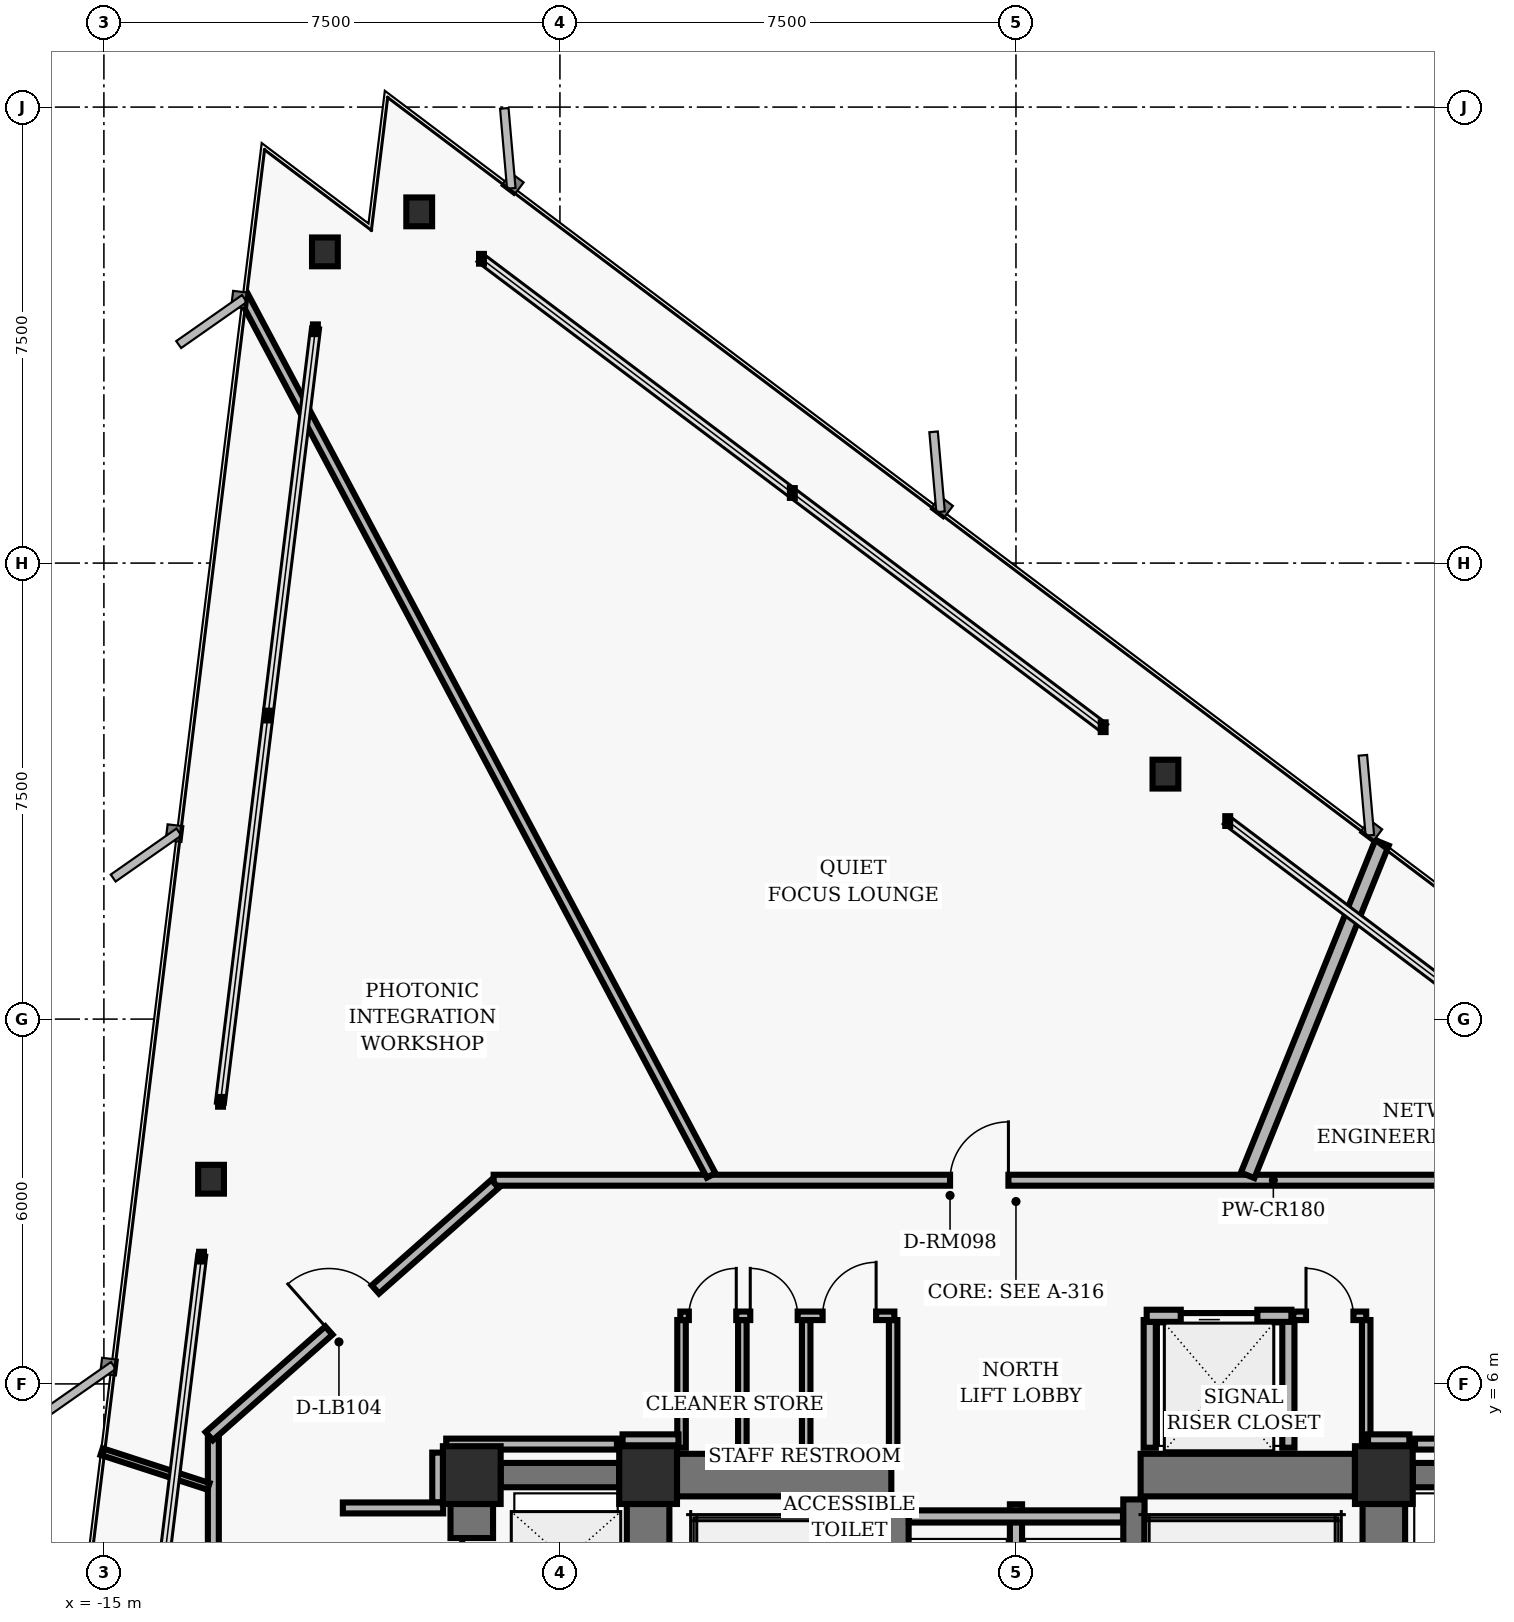
"""IFC4 building model, lengths in metres.
Left out: names, types, materials, properties, quantities, classifications, styles, units other than length and angle.
Written with IfcOpenShell. Run it as: python <this file> out.ifc"""

import sys

from ifc_helpers import new_model, si_unit, direction, frame, frame_2d, origin, origin_2d, place, context, subcontext, project, spatial, rectangle, hollow_rectangle, i_section, extrude, element, fill, save


model = new_model("IFC4")
c1 = context("Model", 3, precision=1e-05, world=origin(), true_north=direction((0.0, 1.0)))
c2 = subcontext(c1, "Body", "Model", "MODEL_VIEW")
j1 = project(units=[si_unit("LENGTHUNIT", "METRE"), si_unit("PLANEANGLEUNIT", "RADIAN")], contexts=[c1])
p1 = place(None, origin())
s1 = spatial("IfcSite", under=j1, at=p1, CompositionType="ELEMENT")
p2 = place(p1, origin())
s2 = spatial("IfcBuilding", under=s1, at=p2, CompositionType="ELEMENT")
p3 = place(p2, frame((0.0, 0.0, 49.6)))
s3 = spatial("IfcBuildingStorey", under=s2, at=p3, CompositionType="ELEMENT", Elevation=49.6)
for number, where, z_axis, x_axis in (
    (1, (-6.05, 4.5, 0.0), (0.0, 0.0, 1.0), (1.0, 0.0, 0.0)),
    (2, (6.05, 4.5, 0.0), (0.0, 0.0, 1.0), (1.0, 0.0, 0.0)),
    (3, (-8.95, 4.5, 0.0), (0.0, 0.0, 1.0), (1.0, 0.0, 0.0)),
):
    element("IfcColumn", number, at=place(p3, frame(where, z_axis=z_axis, x_axis=x_axis)), inside=s3, PredefinedType="COLUMN", context=c2, shape_type="SweptSolid", body=[
        extrude(hollow_rectangle(XDim=0.95, YDim=0.95, WallThickness=0.06, InnerFilletRadius=0.02, OuterFilletRadius=0.04, at=origin_2d()), origin(), (0.0, 0.0, 1.0), 3.36),
    ])
for number, where, z_axis, x_axis in (
    (4, (-6.05, 0.475, 0.0), (0.0, 0.0, 1.0), (0.0, 1.0, 0.0)),
    (5, (6.05, 0.475, 0.0), (0.0, 0.0, 1.0), (0.0, 1.0, 0.0)),
):
    element("IfcWall", number, at=place(p3, frame(where, z_axis=z_axis, x_axis=x_axis)), inside=s3, PredefinedType="SHEAR", context=c2, shape_type="SweptSolid", body=[
        extrude(rectangle(XDim=3.55, YDim=0.7, at=frame_2d((1.775, 0.0))), origin(), (0.0, 0.0, 1.0), 3.098),
    ])
for number, where, z_axis, x_axis in (
    (6, (-1.94, -4.1, 0.0), (0.0, 0.0, 1.0), (0.0, 1.0, 0.0)),
    (7, (1.94, -4.1, 0.0), (0.0, 0.0, 1.0), (0.0, 1.0, 0.0)),
):
    element("IfcWall", number, at=place(p3, frame(where, z_axis=z_axis, x_axis=x_axis)), inside=s3, PredefinedType="SHEAR", context=c2, shape_type="SweptSolid", body=[
        extrude(rectangle(XDim=8.2, YDim=0.35, at=frame_2d((4.1, 0.0))), origin(), (0.0, 0.0, 1.0), 3.098),
    ])
for number, where, z_axis, x_axis in (
    (8, (-5.575, 4.5, 0.0), (0.0, 0.0, 1.0), (1.0, 0.0, 0.0)),
    (9, (2.05, 4.5, 0.0), (0.0, 0.0, 1.0), (1.0, 0.0, 0.0)),
):
    element("IfcWall", number, at=place(p3, frame(where, z_axis=z_axis, x_axis=x_axis)), inside=s3, PredefinedType="SHEAR", context=c2, shape_type="SweptSolid", body=[
        extrude(rectangle(XDim=3.525, YDim=0.7, at=frame_2d((1.762, 0.0))), origin(), (0.0, 0.0, 1.0), 3.098),
    ])
p4 = place(p3, frame((-8.95, -3.825, 0.0), z_axis=(0.0, 0.0, 1.0), x_axis=(0.0, 1.0, 0.0)))
e10 = element("IfcWall", 10, at=p4, inside=s3, PredefinedType="SHEAR", context=c2, shape_type="SweptSolid", body=[
    extrude(rectangle(XDim=7.85, YDim=0.7, at=frame_2d((3.925, 0.0))), origin(), (0.0, 0.0, 1.0), 3.098),
])
p5 = place(p4, frame((0.55, 0.0, 0.0)))
e11 = element("IfcOpeningElement", 11, at=p5, cuts=e10, PredefinedType="OPENING", context=c2, shape_type="SweptSolid", body=[
    extrude(rectangle(XDim=1.06, YDim=2.04, at=frame_2d((0.53, 1.02))), frame((0.0, 0.36, 0.0), z_axis=(0.0, -1.0, 0.0), x_axis=(1.0, 0.0, 0.0)), (0.0, 0.0, 1.0), 0.72),
])
p6 = place(p4, frame((3.395, 0.0, 0.0)))
e12 = element("IfcOpeningElement", 12, at=p6, cuts=e10, PredefinedType="OPENING", context=c2, shape_type="SweptSolid", body=[
    extrude(rectangle(XDim=1.06, YDim=2.04, at=frame_2d((0.53, 1.02))), frame((0.0, 0.36, 0.0), z_axis=(0.0, -1.0, 0.0), x_axis=(1.0, 0.0, 0.0)), (0.0, 0.0, 1.0), 0.72),
])
p7 = place(p4, frame((6.23, 0.0, 0.0)))
e13 = element("IfcOpeningElement", 13, at=p7, cuts=e10, PredefinedType="OPENING", context=c2, shape_type="SweptSolid", body=[
    extrude(rectangle(XDim=1.06, YDim=2.04, at=frame_2d((0.53, 1.02))), frame((0.0, 0.36, 0.0), z_axis=(0.0, -1.0, 0.0), x_axis=(1.0, 0.0, 0.0)), (0.0, 0.0, 1.0), 0.72),
])
for number, where, z_axis, x_axis in (
    (14, (-8.475, 4.5, 0.0), (0.0, 0.0, 1.0), (1.0, 0.0, 0.0)),
    (15, (6.525, 4.5, 0.0), (0.0, 0.0, 1.0), (1.0, 0.0, 0.0)),
):
    element("IfcWall", number, at=place(p3, frame(where, z_axis=z_axis, x_axis=x_axis)), inside=s3, PredefinedType="SHEAR", context=c2, shape_type="SweptSolid", body=[
        extrude(rectangle(XDim=1.95, YDim=0.4, at=frame_2d((0.975, 0.0))), origin(), (0.0, 0.0, 1.0), 3.098),
    ])
for number, where, z_axis, x_axis in (
    (16, (2.458, 16.029, 0.0), (0.0, 0.0, 1.0), (1.0, 0.0, 0.0)),
    (17, (-9.814, 25.277, 0.0), (0.0, 0.0, 1.0), (1.0, 0.0, 0.0)),
    (18, (-11.365, 24.619, 0.0), (0.0, 0.0, 1.0), (1.0, 0.0, 0.0)),
    (19, (-13.238, 9.366, 0.0), (0.0, 0.0, 1.0), (1.0, 0.0, 0.0)),
):
    element("IfcColumn", number, at=place(p3, frame(where, z_axis=z_axis, x_axis=x_axis)), inside=s3, PredefinedType="COLUMN", context=c2, shape_type="SweptSolid", body=[
        extrude(i_section(OverallWidth=0.424, OverallDepth=0.474, WebThickness=0.048, FlangeThickness=0.077, FilletRadius=0.025, at=origin_2d()), origin(), (0.0, 0.0, 1.0), 3.36),
    ])
p8 = place(p3, frame((0.0, 1.25, 0.0), z_axis=(0.0, 0.0, 1.0), x_axis=(0.0, 1.0, 0.0)))
e20 = element("IfcWall", 20, at=p8, inside=s3, PredefinedType="PARTITIONING", context=c2, shape_type="SweptSolid", body=[
    extrude(rectangle(XDim=2.77, YDim=0.2, at=frame_2d((1.385, 0.0))), origin(), (0.0, 0.0, 1.0), 3.073),
])
p9 = place(p3, frame((-1.76, 3.82, 0.0), z_axis=(0.0, 0.0, 1.0), x_axis=(1.0, 0.0, 0.0)))
e21 = element("IfcWall", 21, at=p9, inside=s3, PredefinedType="PARTITIONING", context=c2, shape_type="SweptSolid", body=[
    extrude(rectangle(XDim=3.52, YDim=0.2, at=frame_2d((1.76, 0.0))), origin(), (0.0, 0.0, 1.0), 3.073),
])
for number, where, z_axis, x_axis in (
    (22, (2.2, 4.95, 0.0), (0.0, 0.0, 1.0), (0.0, 1.0, 0.0)),
    (23, (4.48, 4.95, 0.0), (0.0, 0.0, 1.0), (0.0, 1.0, 0.0)),
):
    element("IfcWall", number, at=place(p3, frame(where, z_axis=z_axis, x_axis=x_axis)), inside=s3, PredefinedType="PARTITIONING", context=c2, shape_type="SweptSolid", body=[
        extrude(rectangle(XDim=2.1, YDim=0.2, at=frame_2d((1.05, 0.0))), origin(), (0.0, 0.0, 1.0), 3.073),
    ])
p10 = place(p3, frame((2.15, 7.12, 0.0), z_axis=(0.0, 0.0, 1.0), x_axis=(1.0, 0.0, 0.0)))
e24 = element("IfcWall", 24, at=p10, inside=s3, PredefinedType="PARTITIONING", context=c2, shape_type="SweptSolid", body=[
    extrude(rectangle(XDim=2.38, YDim=0.2, at=frame_2d((1.19, 0.0))), origin(), (0.0, 0.0, 1.0), 2.587),
])
p11 = place(p10, frame((0.56, 0.0, 0.0)))
e25 = element("IfcOpeningElement", 25, at=p11, cuts=e24, PredefinedType="OPENING", context=c2, shape_type="SweptSolid", body=[
    extrude(rectangle(XDim=1.26, YDim=2.06, at=frame_2d((0.63, 1.03))), frame((0.0, 0.11, 0.0), z_axis=(0.0, -1.0, 0.0), x_axis=(1.0, 0.0, 0.0)), (0.0, 0.0, 1.0), 0.22),
])
for number, where, z_axis, x_axis in (
    (26, (-5.5, 4.95, 0.0), (0.0, 0.0, 1.0), (0.0, 1.0, 0.0)),
    (27, (-4.5, 4.95, 0.0), (0.0, 0.0, 1.0), (0.0, 1.0, 0.0)),
    (28, (-3.45, 4.95, 0.0), (0.0, 0.0, 1.0), (0.0, 1.0, 0.0)),
    (29, (-2.02, 4.95, 0.0), (0.0, 0.0, 1.0), (0.0, 1.0, 0.0)),
):
    element("IfcWall", number, at=place(p3, frame(where, z_axis=z_axis, x_axis=x_axis)), inside=s3, PredefinedType="PARTITIONING", context=c2, shape_type="SweptSolid", body=[
        extrude(rectangle(XDim=2.1, YDim=0.14, at=frame_2d((1.05, 0.0))), origin(), (0.0, 0.0, 1.0), 3.073),
    ])
p12 = place(p3, frame((-5.52, 7.12, 0.0), z_axis=(0.0, 0.0, 1.0), x_axis=(1.0, 0.0, 0.0)))
e30 = element("IfcWall", 30, at=p12, inside=s3, PredefinedType="PARTITIONING", context=c2, shape_type="SweptSolid", body=[
    extrude(rectangle(XDim=3.52, YDim=0.14, at=frame_2d((1.76, 0.0))), origin(), (0.0, 0.0, 1.0), 3.073),
])
p13 = place(p12, frame((0.14, 0.0, 0.0)))
e31 = element("IfcOpeningElement", 31, at=p13, cuts=e30, PredefinedType="OPENING", context=c2, shape_type="SweptSolid", body=[
    extrude(rectangle(XDim=0.78, YDim=2.01, at=frame_2d((0.39, 1.005))), frame((0.0, 0.08, 0.0), z_axis=(0.0, -1.0, 0.0), x_axis=(1.0, 0.0, 0.0)), (0.0, 0.0, 1.0), 0.16),
])
p14 = place(p12, frame((1.15, 0.0, 0.0)))
e32 = element("IfcOpeningElement", 32, at=p14, cuts=e30, PredefinedType="OPENING", context=c2, shape_type="SweptSolid", body=[
    extrude(rectangle(XDim=0.78, YDim=2.01, at=frame_2d((0.39, 1.005))), frame((0.0, 0.08, 0.0), z_axis=(0.0, -1.0, 0.0), x_axis=(1.0, 0.0, 0.0)), (0.0, 0.0, 1.0), 0.16),
])
p15 = place(p12, frame((2.34, 0.0, 0.0)))
e33 = element("IfcOpeningElement", 33, at=p15, cuts=e30, PredefinedType="OPENING", context=c2, shape_type="SweptSolid", body=[
    extrude(rectangle(XDim=0.88, YDim=2.02, at=frame_2d((0.44, 1.01))), frame((0.0, 0.08, 0.0), z_axis=(0.0, -1.0, 0.0), x_axis=(1.0, 0.0, 0.0)), (0.0, 0.0, 1.0), 0.16),
])
p16 = place(p3, frame((5.76, 4.95, 0.0), z_axis=(0.0, 0.0, 1.0), x_axis=(0.0, 1.0, 0.0)))
e34 = element("IfcWall", 34, at=p16, inside=s3, PredefinedType="PARTITIONING", context=c2, shape_type="SweptSolid", body=[
    extrude(rectangle(XDim=2.1, YDim=0.14, at=frame_2d((1.05, 0.0))), origin(), (0.0, 0.0, 1.0), 3.073),
])
p17 = place(p3, frame((4.56, 7.12, 0.0), z_axis=(0.0, 0.0, 1.0), x_axis=(1.0, 0.0, 0.0)))
e35 = element("IfcWall", 35, at=p17, inside=s3, PredefinedType="PARTITIONING", context=c2, shape_type="SweptSolid", body=[
    extrude(rectangle(XDim=1.2, YDim=0.14, at=frame_2d((0.6, 0.0))), origin(), (0.0, 0.0, 1.0), 2.587),
])
p18 = place(p17, frame((0.21, 0.0, 0.0)))
e36 = element("IfcOpeningElement", 36, at=p18, cuts=e35, PredefinedType="OPENING", context=c2, shape_type="SweptSolid", body=[
    extrude(rectangle(XDim=0.78, YDim=2.01, at=frame_2d((0.39, 1.005))), frame((0.0, 0.08, 0.0), z_axis=(0.0, -1.0, 0.0), x_axis=(1.0, 0.0, 0.0)), (0.0, 0.0, 1.0), 0.16),
])
p19 = place(p3, frame((-8.59, 9.35, 0.0), z_axis=(0.0, 0.0, 1.0), x_axis=(1.0, 0.0, 0.0)))
e37 = element("IfcWall", 37, at=p19, inside=s3, PredefinedType="PARTITIONING", context=c2, shape_type="SweptSolid", body=[
    extrude(rectangle(XDim=17.18, YDim=0.18, at=frame_2d((8.59, 0.0))), origin(), (0.0, 0.0, 1.0), 3.073),
])
p20 = place(p19, frame((7.506, 0.0, 0.0)))
e38 = element("IfcOpeningElement", 38, at=p20, cuts=e37, PredefinedType="OPENING", context=c2, shape_type="SweptSolid", body=[
    extrude(rectangle(XDim=0.96, YDim=2.02, at=frame_2d((0.48, 1.01))), frame((0.0, 0.1, 0.0), z_axis=(0.0, -1.0, 0.0), x_axis=(1.0, 0.0, 0.0)), (0.0, 0.0, 1.0), 0.2),
])
p21 = place(p3, frame((-13.2, -5.11, 0.0), z_axis=(0.0, 0.0, 1.0), x_axis=(0.0, 1.0, 0.0)))
e39 = element("IfcWall", 39, at=p21, inside=s3, PredefinedType="PARTITIONING", context=c2, shape_type="SweptSolid", body=[
    extrude(rectangle(XDim=10.22, YDim=0.18, at=frame_2d((5.11, 0.0))), origin(), (0.0, 0.0, 1.0), 2.587),
])
p22 = place(p21, frame((5.132, 0.0, 0.0)))
e40 = element("IfcOpeningElement", 40, at=p22, cuts=e39, PredefinedType="OPENING", context=c2, shape_type="SweptSolid", body=[
    extrude(rectangle(XDim=0.96, YDim=2.02, at=frame_2d((0.48, 1.01))), frame((0.0, 0.1, 0.0), z_axis=(0.0, -1.0, 0.0), x_axis=(1.0, 0.0, 0.0)), (0.0, 0.0, 1.0), 0.2),
])
p23 = place(p3, frame((-13.268, 5.14, 0.0), z_axis=(0.0, 0.0, 1.0), x_axis=(0.749626463267, 0.66186113768, 0.0)))
e41 = element("IfcWall", 41, at=p23, inside=s3, PredefinedType="PARTITIONING", context=c2, shape_type="SweptSolid", body=[
    extrude(rectangle(XDim=6.27, YDim=0.18, at=frame_2d((3.135, 0.0))), origin(), (0.0, 0.0, 1.0), 3.073),
])
p24 = place(p23, frame((2.625, 0.0, 0.0)))
e42 = element("IfcOpeningElement", 42, at=p24, cuts=e41, PredefinedType="OPENING", context=c2, shape_type="SweptSolid", body=[
    extrude(rectangle(XDim=1.02, YDim=2.02, at=frame_2d((0.51, 1.01))), frame((0.0, 0.1, 0.0), z_axis=(0.0, -1.0, 0.0), x_axis=(1.0, 0.0, 0.0)), (0.0, 0.0, 1.0), 0.2),
])
p25 = place(p3, frame((-9.51, 4.87, 0.0), z_axis=(0.0, 0.0, 1.0), x_axis=(0.0, -1.0, 0.0)))
e43 = element("IfcWall", 43, at=p25, inside=s3, PredefinedType="PARTITIONING", context=c2, shape_type="SweptSolid", body=[
    extrude(rectangle(XDim=0.82, YDim=0.18, at=frame_2d((0.41, 0.0))), origin(), (0.0, 0.0, 1.0), 3.073),
])
p26 = place(p3, frame((-9.42, 3.96, 0.0), z_axis=(0.0, 0.0, 1.0), x_axis=(-1.0, 0.0, 0.0)))
e44 = element("IfcWall", 44, at=p26, inside=s3, PredefinedType="PARTITIONING", context=c2, shape_type="SweptSolid", body=[
    extrude(rectangle(XDim=1.65, YDim=0.18, at=frame_2d((0.825, 0.0))), origin(), (0.0, 0.0, 1.0), 3.073),
])
p27 = place(p3, frame((9.37, 5.01, 0.0), z_axis=(0.0, 0.0, 1.0), x_axis=(-1.0, 0.0, 0.0)))
e45 = element("IfcWall", 45, at=p27, inside=s3, PredefinedType="PARTITIONING", context=c2, shape_type="SweptSolid", body=[
    extrude(rectangle(XDim=2.808, YDim=0.18, at=frame_2d((1.404, 0.0))), origin(), (0.0, 0.0, 1.0), 3.073),
])
p28 = place(p3, frame((6.47, 5.08, 0.0), z_axis=(0.0, 0.0, 1.0), x_axis=(-1.0, 0.0, 0.0)))
e46 = element("IfcWall", 46, at=p28, inside=s3, PredefinedType="PARTITIONING", context=c2, shape_type="SweptSolid", body=[
    extrude(rectangle(XDim=0.68, YDim=0.18, at=frame_2d((0.34, 0.0))), origin(), (0.0, 0.0, 1.0), 3.073),
])
p29 = place(p3, frame((-5.55, 5.08, 0.0), z_axis=(0.0, 0.0, 1.0), x_axis=(-1.0, 0.0, 0.0)))
e47 = element("IfcWall", 47, at=p29, inside=s3, PredefinedType="PARTITIONING", context=c2, shape_type="SweptSolid", body=[
    extrude(rectangle(XDim=0.92, YDim=0.18, at=frame_2d((0.46, 0.0))), origin(), (0.0, 0.0, 1.0), 3.073),
])
p30 = place(p3, frame((-6.562, 5.01, 0.0), z_axis=(0.0, 0.0, 1.0), x_axis=(-1.0, 0.0, 0.0)))
e48 = element("IfcWall", 48, at=p30, inside=s3, PredefinedType="PARTITIONING", context=c2, shape_type="SweptSolid", body=[
    extrude(rectangle(XDim=2.808, YDim=0.18, at=frame_2d((1.404, 0.0))), origin(), (0.0, 0.0, 1.0), 3.073),
])
p31 = place(p3, frame((3.81, 9.43, 0.0), z_axis=(0.0, 0.0, 1.0), x_axis=(0.374593091461, 0.927189309596, 0.0)))
e49 = element("IfcWall", 49, at=p31, inside=s3, PredefinedType="PARTITIONING", context=c2, shape_type="SweptSolid", body=[
    extrude(rectangle(XDim=5.898, YDim=0.24, at=frame_2d((2.949, 0.0))), origin(), (0.0, 0.0, 1.0), 3.073),
])
p32 = place(p3, frame((-5.014, 9.43, 0.0), z_axis=(0.0, 0.0, 1.0), x_axis=(-0.469473054772, 0.882946799554, 0.0)))
e50 = element("IfcWall", 50, at=p32, inside=s3, PredefinedType="PARTITIONING", context=c2, shape_type="SweptSolid", body=[
    extrude(rectangle(XDim=16.379, YDim=0.16, at=frame_2d((8.19, 0.0))), origin(), (0.0, 0.0, 1.0), 3.073),
])
p33 = place(p3, frame((-13.28, 4.315, 0.0), z_axis=(0.0, 0.0, 1.0), x_axis=(-0.951047661396, 0.309044245624, 0.0)))
e51 = element("IfcWall", 51, at=p33, inside=s3, PredefinedType="MOVABLE", context=c2, shape_type="SweptSolid", body=[
    extrude(rectangle(XDim=1.848, YDim=0.115, at=frame_2d((0.924, 0.0))), origin(), (0.0, 0.0, 1.0), 3.073),
])
p34 = place(p11, origin())
e52 = element("IfcDoor", 52, at=p34, inside=s3, OperationType="SLIDING_TO_LEFT", PredefinedType="DOOR", context=c2, shape_type="SweptSolid", body=[
    extrude(rectangle(XDim=1.26, YDim=2.06, at=frame_2d((0.63, 1.03))), frame((0.0, 0.025, 0.0), z_axis=(0.0, -1.0, 0.0), x_axis=(1.0, 0.0, 0.0)), (0.0, 0.0, 1.0), 0.05),
])
fill(e25, e52)
p35 = place(p13, origin())
e53 = element("IfcDoor", 53, at=p35, inside=s3, OperationType="SINGLE_SWING_RIGHT", PredefinedType="DOOR", context=c2, shape_type="SweptSolid", body=[
    extrude(rectangle(XDim=0.78, YDim=2.01, at=frame_2d((0.39, 1.005))), frame((0.0, 0.025, 0.0), z_axis=(0.0, -1.0, 0.0), x_axis=(1.0, 0.0, 0.0)), (0.0, 0.0, 1.0), 0.05),
])
fill(e31, e53)
p36 = place(p14, origin())
e54 = element("IfcDoor", 54, at=p36, inside=s3, OperationType="SINGLE_SWING_LEFT", PredefinedType="DOOR", context=c2, shape_type="SweptSolid", body=[
    extrude(rectangle(XDim=0.78, YDim=2.01, at=frame_2d((0.39, 1.005))), frame((0.0, 0.025, 0.0), z_axis=(0.0, -1.0, 0.0), x_axis=(1.0, 0.0, 0.0)), (0.0, 0.0, 1.0), 0.05),
])
fill(e32, e54)
p37 = place(p15, origin())
e55 = element("IfcDoor", 55, at=p37, inside=s3, OperationType="SINGLE_SWING_RIGHT", PredefinedType="DOOR", context=c2, shape_type="SweptSolid", body=[
    extrude(rectangle(XDim=0.88, YDim=2.02, at=frame_2d((0.44, 1.01))), frame((0.0, 0.025, 0.0), z_axis=(0.0, -1.0, 0.0), x_axis=(1.0, 0.0, 0.0)), (0.0, 0.0, 1.0), 0.05),
])
fill(e33, e55)
p38 = place(p18, origin())
e56 = element("IfcDoor", 56, at=p38, inside=s3, OperationType="SINGLE_SWING_LEFT", PredefinedType="DOOR", context=c2, shape_type="SweptSolid", body=[
    extrude(rectangle(XDim=0.78, YDim=2.01, at=frame_2d((0.39, 1.005))), frame((0.0, 0.025, 0.0), z_axis=(0.0, -1.0, 0.0), x_axis=(1.0, 0.0, 0.0)), (0.0, 0.0, 1.0), 0.05),
])
fill(e36, e56)
p39 = place(p7, origin())
e57 = element("IfcDoor", 57, at=p39, inside=s3, OperationType="SLIDING_TO_LEFT", PredefinedType="DOOR", context=c2, shape_type="SweptSolid", body=[
    extrude(rectangle(XDim=1.06, YDim=2.04, at=frame_2d((0.53, 1.02))), frame((0.0, 0.025, 0.0), z_axis=(0.0, -1.0, 0.0), x_axis=(1.0, 0.0, 0.0)), (0.0, 0.0, 1.0), 0.05),
])
fill(e13, e57)
p40 = place(p20, origin())
e58 = element("IfcDoor", 58, at=p40, inside=s3, OperationType="SINGLE_SWING_RIGHT", PredefinedType="DOOR", context=c2, shape_type="SweptSolid", body=[
    extrude(rectangle(XDim=0.96, YDim=2.02, at=frame_2d((0.48, 1.01))), frame((0.0, 0.025, 0.0), z_axis=(0.0, -1.0, 0.0), x_axis=(1.0, 0.0, 0.0)), (0.0, 0.0, 1.0), 0.05),
])
fill(e38, e58)
p41 = place(p24, origin())
e59 = element("IfcDoor", 59, at=p41, inside=s3, OperationType="SINGLE_SWING_LEFT", PredefinedType="DOOR", context=c2, shape_type="SweptSolid", body=[
    extrude(rectangle(XDim=1.02, YDim=2.02, at=frame_2d((0.51, 1.01))), frame((0.0, 0.025, 0.0), z_axis=(0.0, -1.0, 0.0), x_axis=(1.0, 0.0, 0.0)), (0.0, 0.0, 1.0), 0.05),
])
fill(e42, e59)
save(model, sys.argv[1])
